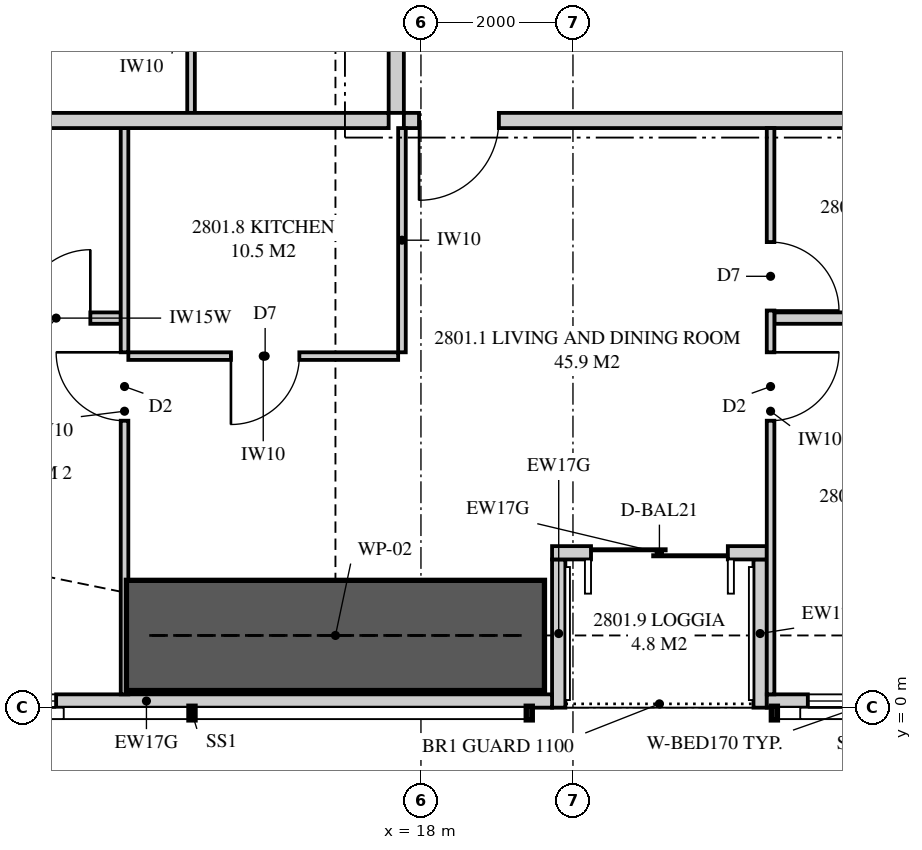
"""IFC4 building model, lengths in metres.
Left out: names, types, materials, properties, quantities, classifications, styles, units other than length and angle.
Written with IfcOpenShell. Run it as: python <this file> out.ifc"""

import sys

from ifc_helpers import new_model, si_unit, direction, frame, frame_2d, origin, place, context, subcontext, project, spatial, polyline, rectangle, outline, extrude, element, fill, save


model = new_model("IFC4")
c1 = context("Model", 3, precision=1e-05, world=origin(), true_north=direction((0.0, 1.0)))
c2 = subcontext(c1, "Body", "Model", "MODEL_VIEW")
j1 = project(units=[si_unit("LENGTHUNIT", "METRE"), si_unit("PLANEANGLEUNIT", "RADIAN")], contexts=[c1])
p1 = place(None, origin())
s1 = spatial("IfcSite", under=j1, at=p1, CompositionType="ELEMENT")
p2 = place(p1, origin())
s2 = spatial("IfcBuilding", under=s1, at=p2, CompositionType="ELEMENT")
p3 = place(p2, frame((0.0, 0.0, 104.85)))
s3 = spatial("IfcBuildingStorey", under=s2, at=p3, CompositionType="ELEMENT", Elevation=104.85)
p4 = place(p3, frame((9.051, 0.087, 0.0), z_axis=(0.0, 0.0, 1.0), x_axis=(1.0, 0.0, 0.0)))
e1 = element("IfcWall", 1, at=p4, inside=s3, PredefinedType="SOLIDWALL", context=c2, shape_type="SweptSolid", body=[
    extrude(outline(polyline([(0.0, 0.0), (10.674, 0.0), (10.674, 2.15), (7.824, 2.15), (7.824, 3.11), (7.666, 3.11), (7.666, 2.15), (7.62, 2.15), (7.62, 3.11), (0.0, 3.11), (0.0, 0.0)])), frame((0.0, 0.087, 0.0), z_axis=(0.0, -1.0, 0.0), x_axis=(1.0, 0.0, 0.0)), (0.0, 0.0, 1.0), 0.175),
])
p5 = place(p4, frame((2.349, 0.0, 0.4)))
e2 = element("IfcOpeningElement", 2, at=p5, cuts=e1, PredefinedType="OPENING", context=c2, shape_type="SweptSolid", body=[
    extrude(rectangle(XDim=1.8, YDim=1.7, at=frame_2d((0.9, 0.85))), frame((0.0, 0.097, 0.0), z_axis=(0.0, -1.0, 0.0), x_axis=(1.0, 0.0, 0.0)), (0.0, 0.0, 1.0), 0.195),
])
p6 = place(p3, frame((22.55, 0.087, 0.0), z_axis=(0.0, 0.0, 1.0), x_axis=(1.0, 0.0, 0.0)))
e3 = element("IfcWall", 3, at=p6, inside=s3, PredefinedType="SOLIDWALL", context=c2, shape_type="SweptSolid", body=[
    extrude(rectangle(XDim=8.3, YDim=0.175, at=frame_2d((4.15, 0.0))), origin(), (0.0, 0.0, 1.0), 2.15),
])
p7 = place(p6, frame((0.54, 0.0, 0.4)))
e4 = element("IfcOpeningElement", 4, at=p7, cuts=e3, PredefinedType="OPENING", context=c2, shape_type="SweptSolid", body=[
    extrude(rectangle(XDim=1.8, YDim=1.7, at=frame_2d((0.9, 0.85))), frame((0.0, 0.097, 0.0), z_axis=(0.0, -1.0, 0.0), x_axis=(1.0, 0.0, 0.0)), (0.0, 0.0, 1.0), 0.195),
])
p8 = place(p3, frame((19.725, 2.038, 0.0), z_axis=(0.0, 0.0, 1.0), x_axis=(1.0, 0.0, 0.0)))
e5 = element("IfcWall", 5, at=p8, inside=s3, PredefinedType="SOLIDWALL", context=c2, shape_type="SweptSolid", body=[
    extrude(rectangle(XDim=2.825, YDim=0.175, at=frame_2d((1.413, 0.0))), origin(), (0.0, 0.0, 1.0), 3.11),
])
p9 = place(p8, frame((0.512, 0.0, 0.0)))
e6 = element("IfcOpeningElement", 6, at=p9, cuts=e5, PredefinedType="OPENING", context=c2, shape_type="SweptSolid", body=[
    extrude(rectangle(XDim=1.8, YDim=2.1, at=frame_2d((0.9, 1.05))), frame((0.0, 0.097, 0.0), z_axis=(0.0, -1.0, 0.0), x_axis=(1.0, 0.0, 0.0)), (0.0, 0.0, 1.0), 0.195),
])
for number, where, z_axis, x_axis in (
    (7, (19.812, 0.0, 0.0), (0.0, 0.0, 1.0), (0.0, 1.0, 0.0)),
    (8, (22.462, 0.0, 0.0), (0.0, 0.0, 1.0), (0.0, 1.0, 0.0)),
):
    element("IfcWall", number, at=place(p3, frame(where, z_axis=z_axis, x_axis=x_axis)), inside=s3, PredefinedType="SOLIDWALL", context=c2, shape_type="SweptSolid", body=[
        extrude(outline(polyline([(0.0, 0.0), (1.95, 0.0), (1.95, 3.11), (1.75, 3.11), (1.75, 2.15), (0.15, 2.15), (0.15, 3.11), (0.0, 3.11), (0.0, 0.0)])), frame((0.0, 0.087, 0.0), z_axis=(0.0, -1.0, 0.0), x_axis=(1.0, 0.0, 0.0)), (0.0, 0.0, 1.0), 0.175),
    ])
p10 = place(p3, frame((17.775, 7.725, 0.0), z_axis=(0.0, 0.0, 1.0), x_axis=(1.0, 0.0, 0.0)))
e9 = element("IfcWall", 9, at=p10, inside=s3, PredefinedType="PARTITIONING", context=c2, shape_type="SweptSolid", body=[
    extrude(rectangle(XDim=8.225, YDim=0.2, at=frame_2d((4.113, 0.0))), origin(), (0.0, 0.0, 1.0), 3.11),
])
p11 = place(p10, frame((0.2, 0.0, 0.0)))
e10 = element("IfcOpeningElement", 10, at=p11, cuts=e9, PredefinedType="OPENING", context=c2, shape_type="SweptSolid", body=[
    extrude(rectangle(XDim=1.05, YDim=2.2, at=frame_2d((0.525, 1.1))), frame((0.0, 0.11, 0.0), z_axis=(0.0, -1.0, 0.0), x_axis=(1.0, 0.0, 0.0)), (0.0, 0.0, 1.0), 0.22),
])
p12 = place(p3, frame((14.1, 0.175, 0.0), z_axis=(0.0, 0.0, 1.0), x_axis=(0.0, 1.0, 0.0)))
e11 = element("IfcWall", 11, at=p12, inside=s3, PredefinedType="PARTITIONING", context=c2, shape_type="SweptSolid", body=[
    extrude(outline(polyline([(0.0, 0.0), (7.45, 0.0), (7.45, 3.11), (2.219, 3.11), (2.219, 2.15), (0.463, 2.15), (0.463, 3.11), (0.0, 3.11), (0.0, 0.0)])), frame((0.0, 0.05, 0.0), z_axis=(0.0, -1.0, 0.0), x_axis=(1.0, 0.0, 0.0)), (0.0, 0.0, 1.0), 0.1),
])
p13 = place(p12, frame((3.6, 0.0, 0.0)))
e12 = element("IfcOpeningElement", 12, at=p13, cuts=e11, PredefinedType="OPENING", context=c2, shape_type="SweptSolid", body=[
    extrude(rectangle(XDim=0.9, YDim=2.1, at=frame_2d((0.45, 1.05))), frame((0.0, 0.06, 0.0), z_axis=(0.0, -1.0, 0.0), x_axis=(1.0, 0.0, 0.0)), (0.0, 0.0, 1.0), 0.12),
])
p14 = place(p3, frame((22.6, 0.175, 0.0), z_axis=(0.0, 0.0, 1.0), x_axis=(0.0, 1.0, 0.0)))
e13 = element("IfcWall", 13, at=p14, inside=s3, PredefinedType="PARTITIONING", context=c2, shape_type="SweptSolid", body=[
    extrude(outline(polyline([(0.0, 0.0), (7.45, 0.0), (7.45, 3.11), (1.635, 3.11), (1.635, 2.15), (0.0, 2.15), (0.0, 3.11), (0.0, 0.0)])), frame((0.0, 0.05, 0.0), z_axis=(0.0, -1.0, 0.0), x_axis=(1.0, 0.0, 0.0)), (0.0, 0.0, 1.0), 0.1),
])
p15 = place(p14, frame((3.6, 0.0, 0.0)))
e14 = element("IfcOpeningElement", 14, at=p15, cuts=e13, PredefinedType="OPENING", context=c2, shape_type="SweptSolid", body=[
    extrude(rectangle(XDim=0.9, YDim=2.1, at=frame_2d((0.45, 1.05))), frame((0.0, 0.06, 0.0), z_axis=(0.0, -1.0, 0.0), x_axis=(1.0, 0.0, 0.0)), (0.0, 0.0, 1.0), 0.12),
])
p16 = place(p14, frame((5.05, 0.0, 0.0)))
e15 = element("IfcOpeningElement", 15, at=p16, cuts=e13, PredefinedType="OPENING", context=c2, shape_type="SweptSolid", body=[
    extrude(rectangle(XDim=0.9, YDim=2.1, at=frame_2d((0.45, 1.05))), frame((0.0, 0.06, 0.0), z_axis=(0.0, -1.0, 0.0), x_axis=(1.0, 0.0, 0.0)), (0.0, 0.0, 1.0), 0.12),
])
p17 = place(p3, frame((10.55, 5.125, 0.0), z_axis=(0.0, 0.0, 1.0), x_axis=(1.0, 0.0, 0.0)))
e16 = element("IfcWall", 16, at=p17, inside=s3, PredefinedType="PLUMBINGWALL", context=c2, shape_type="SweptSolid", body=[
    extrude(outline(polyline([(0.0, 0.0), (3.5, 0.0), (3.5, 3.11), (0.935, 3.11), (0.935, 2.51), (0.0, 2.51), (0.0, 3.11), (0.0, 0.0)])), frame((0.0, 0.075, 0.0), z_axis=(0.0, -1.0, 0.0), x_axis=(1.0, 0.0, 0.0)), (0.0, 0.0, 1.0), 0.15),
])
p18 = place(p17, frame((2.2, 0.0, 0.0)))
e17 = element("IfcOpeningElement", 17, at=p18, cuts=e16, PredefinedType="OPENING", context=c2, shape_type="SweptSolid", body=[
    extrude(rectangle(XDim=0.9, YDim=2.1, at=frame_2d((0.45, 1.05))), frame((0.0, 0.085, 0.0), z_axis=(0.0, -1.0, 0.0), x_axis=(1.0, 0.0, 0.0)), (0.0, 0.0, 1.0), 0.17),
])
p19 = place(p3, frame((22.65, 5.125, 0.0), z_axis=(0.0, 0.0, 1.0), x_axis=(1.0, 0.0, 0.0)))
e18 = element("IfcWall", 18, at=p19, inside=s3, PredefinedType="PLUMBINGWALL", context=c2, shape_type="SweptSolid", body=[
    extrude(rectangle(XDim=3.35, YDim=0.15, at=frame_2d((1.675, 0.0))), origin(), (0.0, 0.0, 1.0), 3.11),
])
p20 = place(p3, frame((14.15, 4.625, 0.0), z_axis=(0.0, 0.0, 1.0), x_axis=(1.0, 0.0, 0.0)))
e19 = element("IfcWall", 19, at=p20, inside=s3, PredefinedType="PARTITIONING", context=c2, shape_type="SweptSolid", body=[
    extrude(outline(polyline([(0.0, 0.0), (3.55, 0.0), (3.55, 3.11), (3.012, 3.11), (3.012, 2.541), (2.438, 2.541), (2.438, 3.11), (0.0, 3.11), (0.0, 0.0)])), frame((0.0, 0.05, 0.0), z_axis=(0.0, -1.0, 0.0), x_axis=(1.0, 0.0, 0.0)), (0.0, 0.0, 1.0), 0.1),
])
p21 = place(p20, frame((1.35, 0.0, 0.0)))
e20 = element("IfcOpeningElement", 20, at=p21, cuts=e19, PredefinedType="OPENING", context=c2, shape_type="SweptSolid", body=[
    extrude(rectangle(XDim=0.9, YDim=2.1, at=frame_2d((0.45, 1.05))), frame((0.0, 0.06, 0.0), z_axis=(0.0, -1.0, 0.0), x_axis=(1.0, 0.0, 0.0)), (0.0, 0.0, 1.0), 0.12),
])
p22 = place(p3, frame((17.75, 4.675, 0.0), z_axis=(0.0, 0.0, 1.0), x_axis=(0.0, 1.0, 0.0)))
e21 = element("IfcWall", 21, at=p22, inside=s3, PredefinedType="PARTITIONING", context=c2, shape_type="SweptSolid", body=[
    extrude(rectangle(XDim=2.95, YDim=0.1, at=frame_2d((1.475, 0.0))), origin(), (0.0, 0.0, 1.0), 3.11),
])
p23 = place(p3, frame((6.0, 7.725, 0.0), z_axis=(0.0, 0.0, 1.0), x_axis=(1.0, 0.0, 0.0)))
e22 = element("IfcWall", 22, at=p23, inside=s3, PredefinedType="PARTITIONING", context=c2, shape_type="SweptSolid", body=[
    extrude(outline(polyline([(0.0, 0.0), (11.575, 0.0), (11.575, 3.11), (11.212, 3.11), (11.212, 2.541), (10.538, 2.541), (10.538, 3.11), (5.51, 3.11), (5.51, 2.51), (2.969, 2.51), (2.969, 2.541), (2.727, 2.541), (2.727, 2.15), (0.884, 2.15), (0.884, 3.11), (0.0, 3.11), (0.0, 0.0)])), frame((0.0, 0.1, 0.0), z_axis=(0.0, -1.0, 0.0), x_axis=(1.0, 0.0, 0.0)), (0.0, 0.0, 1.0), 0.2),
])
p24 = place(p3, frame((17.675, 7.825, 0.0), z_axis=(0.0, 0.0, 1.0), x_axis=(0.0, 1.0, 0.0)))
e23 = element("IfcWall", 23, at=p24, inside=s3, PredefinedType="PARTITIONING", context=c2, shape_type="SweptSolid", body=[
    extrude(outline(polyline([(0.0, 0.0), (6.637, 0.0), (6.637, 3.11), (3.087, 3.11), (3.087, 2.541), (2.413, 2.541), (2.413, 3.11), (0.0, 3.11), (0.0, 0.0)])), frame((0.0, 0.1, 0.0), z_axis=(0.0, -1.0, 0.0), x_axis=(1.0, 0.0, 0.0)), (0.0, 0.0, 1.0), 0.2),
])
p25 = place(p3, frame((14.975, 7.825, 0.0), z_axis=(0.0, 0.0, 1.0), x_axis=(0.0, 1.0, 0.0)))
e24 = element("IfcWall", 24, at=p25, inside=s3, PredefinedType="PARTITIONING", context=c2, shape_type="SweptSolid", body=[
    extrude(outline(polyline([(0.0, 0.0), (3.45, 0.0), (3.45, 3.11), (3.037, 3.11), (3.037, 2.541), (2.463, 2.541), (2.463, 3.11), (0.0, 3.11), (0.0, 0.0)])), frame((0.0, 0.05, 0.0), z_axis=(0.0, -1.0, 0.0), x_axis=(1.0, 0.0, 0.0)), (0.0, 0.0, 1.0), 0.1),
])
p26 = place(p3, frame((14.125, 0.95, 0.0), z_axis=(0.0, 0.0, 1.0), x_axis=(1.0, 0.0, 0.0)))
e25 = element("IfcWall", 25, at=p26, inside=s3, PredefinedType="SHEAR", context=c2, shape_type="SweptSolid", body=[
    extrude(rectangle(XDim=5.5, YDim=1.45, at=frame_2d((2.75, 0.0))), origin(), (0.0, 0.0, 1.0), 3.35),
])
p27 = place(p5, origin())
e26 = element("IfcWindow", 26, at=p27, inside=s3, PartitioningType="SINGLE_PANEL", PredefinedType="WINDOW", context=c2, shape_type="SweptSolid", body=[
    extrude(rectangle(XDim=1.8, YDim=1.7, at=frame_2d((0.9, 0.85))), frame((0.0, 0.03, 0.0), z_axis=(0.0, -1.0, 0.0), x_axis=(1.0, 0.0, 0.0)), (0.0, 0.0, 1.0), 0.06),
])
fill(e2, e26)
p28 = place(p9, origin())
e27 = element("IfcDoor", 27, at=p28, inside=s3, OperationType="SLIDING_TO_LEFT", PredefinedType="DOOR", context=c2, shape_type="SweptSolid", body=[
    extrude(rectangle(XDim=1.8, YDim=2.1, at=frame_2d((0.9, 1.05))), frame((0.0, 0.025, 0.0), z_axis=(0.0, -1.0, 0.0), x_axis=(1.0, 0.0, 0.0)), (0.0, 0.0, 1.0), 0.05),
])
fill(e6, e27)
p29 = place(p7, origin())
e28 = element("IfcWindow", 28, at=p29, inside=s3, PartitioningType="SINGLE_PANEL", PredefinedType="WINDOW", context=c2, shape_type="SweptSolid", body=[
    extrude(rectangle(XDim=1.8, YDim=1.7, at=frame_2d((0.9, 0.85))), frame((0.0, 0.03, 0.0), z_axis=(0.0, -1.0, 0.0), x_axis=(1.0, 0.0, 0.0)), (0.0, 0.0, 1.0), 0.06),
])
fill(e4, e28)
p30 = place(p11, frame((1.05, 0.0, 0.0), z_axis=(0.0, 0.0, 1.0), x_axis=(-1.0, 0.0, 0.0)))
e29 = element("IfcDoor", 29, at=p30, inside=s3, OperationType="SINGLE_SWING_RIGHT", PredefinedType="DOOR", context=c2, shape_type="SweptSolid", body=[
    extrude(rectangle(XDim=1.05, YDim=2.2, at=frame_2d((0.525, 1.1))), frame((0.0, 0.025, 0.0), z_axis=(0.0, -1.0, 0.0), x_axis=(1.0, 0.0, 0.0)), (0.0, 0.0, 1.0), 0.05),
])
fill(e10, e29)
p31 = place(p13, origin())
e30 = element("IfcDoor", 30, at=p31, inside=s3, OperationType="SINGLE_SWING_RIGHT", PredefinedType="DOOR", context=c2, shape_type="SweptSolid", body=[
    extrude(rectangle(XDim=0.9, YDim=2.1, at=frame_2d((0.45, 1.05))), frame((0.0, 0.025, 0.0), z_axis=(0.0, -1.0, 0.0), x_axis=(1.0, 0.0, 0.0)), (0.0, 0.0, 1.0), 0.05),
])
fill(e12, e30)
p32 = place(p18, origin())
e31 = element("IfcDoor", 31, at=p32, inside=s3, OperationType="SINGLE_SWING_RIGHT", PredefinedType="DOOR", context=c2, shape_type="SweptSolid", body=[
    extrude(rectangle(XDim=0.9, YDim=2.1, at=frame_2d((0.45, 1.05))), frame((0.0, 0.025, 0.0), z_axis=(0.0, -1.0, 0.0), x_axis=(1.0, 0.0, 0.0)), (0.0, 0.0, 1.0), 0.05),
])
fill(e17, e31)
p33 = place(p15, frame((0.9, 0.0, 0.0), z_axis=(0.0, 0.0, 1.0), x_axis=(-1.0, 0.0, 0.0)))
e32 = element("IfcDoor", 32, at=p33, inside=s3, OperationType="SINGLE_SWING_LEFT", PredefinedType="DOOR", context=c2, shape_type="SweptSolid", body=[
    extrude(rectangle(XDim=0.9, YDim=2.1, at=frame_2d((0.45, 1.05))), frame((0.0, 0.025, 0.0), z_axis=(0.0, -1.0, 0.0), x_axis=(1.0, 0.0, 0.0)), (0.0, 0.0, 1.0), 0.05),
])
fill(e14, e32)
p34 = place(p16, frame((0.9, 0.0, 0.0), z_axis=(0.0, 0.0, 1.0), x_axis=(-1.0, 0.0, 0.0)))
e33 = element("IfcDoor", 33, at=p34, inside=s3, OperationType="SINGLE_SWING_RIGHT", PredefinedType="DOOR", context=c2, shape_type="SweptSolid", body=[
    extrude(rectangle(XDim=0.9, YDim=2.1, at=frame_2d((0.45, 1.05))), frame((0.0, 0.025, 0.0), z_axis=(0.0, -1.0, 0.0), x_axis=(1.0, 0.0, 0.0)), (0.0, 0.0, 1.0), 0.05),
])
fill(e15, e33)
p35 = place(p21, frame((0.9, 0.0, 0.0), z_axis=(0.0, 0.0, 1.0), x_axis=(-1.0, 0.0, 0.0)))
e34 = element("IfcDoor", 34, at=p35, inside=s3, OperationType="SINGLE_SWING_RIGHT", PredefinedType="DOOR", context=c2, shape_type="SweptSolid", body=[
    extrude(rectangle(XDim=0.9, YDim=2.1, at=frame_2d((0.45, 1.05))), frame((0.0, 0.025, 0.0), z_axis=(0.0, -1.0, 0.0), x_axis=(1.0, 0.0, 0.0)), (0.0, 0.0, 1.0), 0.05),
])
fill(e20, e34)
save(model, sys.argv[1])
